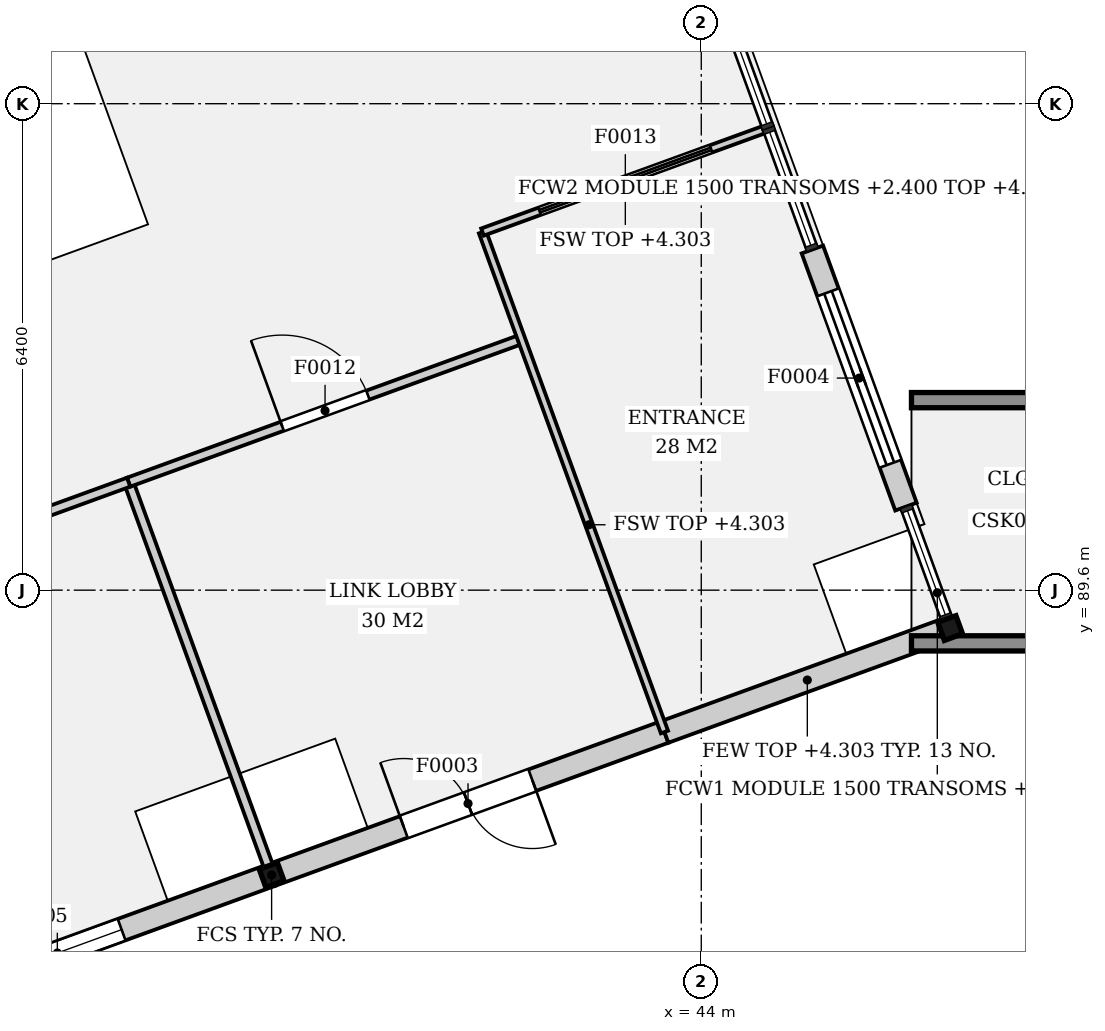
"""IFC4 building model, lengths in metres.
Left out: names, types, materials, properties, quantities, classifications, styles, units other than length and angle.
Written with IfcOpenShell. Run it as: python <this file> out.ifc"""

import sys

from ifc_helpers import new_model, si_unit, direction, frame, frame_2d, origin, origin_2d, place, context, subcontext, project, spatial, rectangle, hollow_rectangle, extrude, element, fill, save


model = new_model("IFC4")
c1 = context("Model", 3, precision=1e-05, world=origin(), true_north=direction((0.0, 1.0)))
c2 = subcontext(c1, "Body", "Model", "MODEL_VIEW")
j1 = project(units=[si_unit("LENGTHUNIT", "METRE"), si_unit("PLANEANGLEUNIT", "RADIAN")], contexts=[c1])
p1 = place(None, origin())
s1 = spatial("IfcSite", under=j1, at=p1, CompositionType="ELEMENT")
p2 = place(p1, origin())
s2 = spatial("IfcBuilding", under=s1, at=p2, CompositionType="ELEMENT")
p3 = place(p2, origin())
s3 = spatial("IfcBuildingStorey", under=s2, at=p3, CompositionType="ELEMENT", Elevation=0.0)
for number, where, z_axis, x_axis in (
    (1, (38.347, 85.852, 0.0), (0.0, 0.0, 1.0), (0.94, 0.342, 0.0)),
    (2, (47.274, 89.102, 0.0), (0.0, 0.0, 1.0), (0.94, 0.342, 0.0)),
):
    element("IfcColumn", number, at=place(p3, frame(where, z_axis=z_axis, x_axis=x_axis)), inside=s3, PredefinedType="COLUMN", context=c2, shape_type="SweptSolid", body=[
        extrude(hollow_rectangle(XDim=0.254, YDim=0.254, WallThickness=0.012, at=origin_2d()), origin(), (0.0, 0.0, 1.0), 5.0),
    ])
p4 = place(p3, frame((32.709, 83.8, 0.0), z_axis=(0.0, 0.0, 1.0), x_axis=(0.939691215801, 0.342024003465, 0.0)))
e3 = element("IfcWall", 3, at=p4, inside=s3, PredefinedType="ELEMENTEDWALL", context=c2, shape_type="SweptSolid", body=[
    extrude(rectangle(XDim=6.0, YDim=0.3, at=frame_2d((3.0, 0.0))), origin(), (0.0, 0.0, 1.0), 4.303),
])
p5 = place(p4, frame((2.1, 0.0, 0.9)))
e4 = element("IfcOpeningElement", 4, at=p5, cuts=e3, PredefinedType="OPENING", context=c2, shape_type="SweptSolid", body=[
    extrude(rectangle(XDim=1.8, YDim=2.4, at=frame_2d((0.9, 1.2))), frame((0.0, 0.16, 0.0), z_axis=(0.0, -1.0, 0.0), x_axis=(1.0, 0.0, 0.0)), (0.0, 0.0, 1.0), 0.32),
])
p6 = place(p3, frame((38.347, 85.852, 0.0), z_axis=(0.0, 0.0, 1.0), x_axis=(0.939690992795, 0.34202461616, 0.0)))
e5 = element("IfcWall", 5, at=p6, inside=s3, PredefinedType="ELEMENTEDWALL", context=c2, shape_type="SweptSolid", body=[
    extrude(rectangle(XDim=5.5, YDim=0.3, at=frame_2d((2.75, 0.0))), origin(), (0.0, 0.0, 1.0), 4.303),
])
p7 = place(p6, frame((1.85, 0.0, 0.0)))
e6 = element("IfcOpeningElement", 6, at=p7, cuts=e5, PredefinedType="OPENING", context=c2, shape_type="SweptSolid", body=[
    extrude(rectangle(XDim=1.8, YDim=2.1, at=frame_2d((0.9, 1.05))), frame((0.0, 0.16, 0.0), z_axis=(0.0, -1.0, 0.0), x_axis=(1.0, 0.0, 0.0)), (0.0, 0.0, 1.0), 0.32),
])
p8 = place(p3, frame((43.516, 87.733, 0.0), z_axis=(0.0, 0.0, 1.0), x_axis=(0.939686455819, 0.342037080957, 0.0)))
e7 = element("IfcWall", 7, at=p8, inside=s3, PredefinedType="ELEMENTEDWALL", context=c2, shape_type="SweptSolid", body=[
    extrude(rectangle(XDim=4.0, YDim=0.3, at=frame_2d((2.0, 0.0))), origin(), (0.0, 0.0, 1.0), 4.303),
])
p9 = place(p3, frame((46.693, 90.699, 0.0), z_axis=(0.0, 0.0, 1.0), x_axis=(-0.342009868999, 0.939696360271, 0.0)))
e8 = element("IfcWall", 8, at=p9, inside=s3, PredefinedType="ELEMENTEDWALL", context=c2, shape_type="SweptSolid", body=[
    extrude(rectangle(XDim=3.6, YDim=0.3, at=frame_2d((1.8, 0.0))), origin(), (0.0, 0.0, 1.0), 4.303),
])
p10 = place(p9, frame((0.6, 0.0, 0.0)))
e9 = element("IfcOpeningElement", 9, at=p10, cuts=e8, PredefinedType="OPENING", context=c2, shape_type="SweptSolid", body=[
    extrude(rectangle(XDim=2.4, YDim=2.4, at=frame_2d((1.2, 1.2))), frame((0.0, 0.16, 0.0), z_axis=(0.0, -1.0, 0.0), x_axis=(1.0, 0.0, 0.0)), (0.0, 0.0, 1.0), 0.32),
])
p11 = place(p3, frame((46.765, 92.1, 0.0), z_axis=(0.0, 0.0, 1.0), x_axis=(1.0, 0.0, 0.0)))
e10 = element("IfcWall", 10, at=p11, inside=s3, PredefinedType="ELEMENTEDWALL", context=c2, shape_type="SweptSolid", body=[
    extrude(rectangle(XDim=5.235, YDim=0.2, at=frame_2d((2.617, 0.0))), origin(), (0.0, 0.0, 1.0), 3.2),
])
p12 = place(p11, frame((1.717, 0.0, 0.0)))
e11 = element("IfcOpeningElement", 11, at=p12, cuts=e10, PredefinedType="OPENING", context=c2, shape_type="SweptSolid", body=[
    extrude(rectangle(XDim=1.8, YDim=2.4, at=frame_2d((0.9, 1.2))), frame((0.0, 0.11, 0.0), z_axis=(0.0, -1.0, 0.0), x_axis=(1.0, 0.0, 0.0)), (0.0, 0.0, 1.0), 0.22),
])
p13 = place(p3, frame((46.765, 88.9, 0.0), z_axis=(0.0, 0.0, 1.0), x_axis=(1.0, 0.0, 0.0)))
e12 = element("IfcWall", 12, at=p13, inside=s3, PredefinedType="ELEMENTEDWALL", context=c2, shape_type="SweptSolid", body=[
    extrude(rectangle(XDim=5.235, YDim=0.2, at=frame_2d((2.617, 0.0))), origin(), (0.0, 0.0, 1.0), 3.2),
])
p14 = place(p13, frame((1.817, 0.0, 0.9)))
e13 = element("IfcOpeningElement", 13, at=p14, cuts=e12, PredefinedType="OPENING", context=c2, shape_type="SweptSolid", body=[
    extrude(rectangle(XDim=1.6, YDim=1.6, at=frame_2d((0.8, 0.8))), frame((0.0, 0.11, 0.0), z_axis=(0.0, -1.0, 0.0), x_axis=(1.0, 0.0, 0.0)), (0.0, 0.0, 1.0), 0.22),
])
p15 = place(p3, frame((38.347, 85.852, 0.0), z_axis=(0.0, 0.0, 1.0), x_axis=(-0.34202461616, 0.939690992795, 0.0)))
e14 = element("IfcWall", 14, at=p15, inside=s3, PredefinedType="PARTITIONING", context=c2, shape_type="SweptSolid", body=[
    extrude(rectangle(XDim=5.5, YDim=0.125, at=frame_2d((2.75, 0.0))), origin(), (0.0, 0.0, 1.0), 4.187),
])
p16 = place(p3, frame((36.466, 91.021, 0.0), z_axis=(0.0, 0.0, 1.0), x_axis=(0.939690992795, 0.34202461616, 0.0)))
e15 = element("IfcWall", 15, at=p16, inside=s3, PredefinedType="PARTITIONING", context=c2, shape_type="SweptSolid", body=[
    extrude(rectangle(XDim=5.5, YDim=0.125, at=frame_2d((2.75, 0.0))), origin(), (0.0, 0.0, 1.0), 4.187),
])
p17 = place(p16, frame((2.15, 0.0, 0.0)))
e16 = element("IfcOpeningElement", 16, at=p17, cuts=e15, PredefinedType="OPENING", context=c2, shape_type="SweptSolid", body=[
    extrude(rectangle(XDim=1.2, YDim=2.1, at=frame_2d((0.6, 1.05))), frame((0.0, 0.073, 0.0), z_axis=(0.0, -1.0, 0.0), x_axis=(1.0, 0.0, 0.0)), (0.0, 0.0, 1.0), 0.145),
])
p18 = place(p3, frame((30.828, 88.969, 0.0), z_axis=(0.0, 0.0, 1.0), x_axis=(0.939704292321, 0.341988074343, 0.0)))
e17 = element("IfcWall", 17, at=p18, inside=s3, PredefinedType="PARTITIONING", context=c2, shape_type="SweptSolid", body=[
    extrude(rectangle(XDim=6.0, YDim=0.125, at=frame_2d((3.0, 0.0))), origin(), (0.0, 0.0, 1.0), 4.187),
])
p19 = place(p18, frame((2.4, 0.0, 0.0)))
e18 = element("IfcOpeningElement", 18, at=p19, cuts=e17, PredefinedType="OPENING", context=c2, shape_type="SweptSolid", body=[
    extrude(rectangle(XDim=1.2, YDim=2.1, at=frame_2d((0.6, 1.05))), frame((0.0, 0.073, 0.0), z_axis=(0.0, -1.0, 0.0), x_axis=(1.0, 0.0, 0.0)), (0.0, 0.0, 1.0), 0.145),
])
p20 = place(p3, frame((43.516, 87.733, 0.0), z_axis=(0.0, 0.0, 1.0), x_axis=(-0.342037080957, 0.939686455819, 0.0)))
e19 = element("IfcWall", 19, at=p20, inside=s3, PredefinedType="PARTITIONING", context=c2, shape_type="SweptSolid", body=[
    extrude(rectangle(XDim=7.0, YDim=0.1, at=frame_2d((3.5, 0.0))), origin(), (0.0, 0.0, 1.0), 4.303),
])
p21 = place(p3, frame((41.121, 94.311, 0.0), z_axis=(0.0, 0.0, 1.0), x_axis=(0.939706071622, 0.341983185197, 0.0)))
e20 = element("IfcWall", 20, at=p21, inside=s3, PredefinedType="PARTITIONING", context=c2, shape_type="SweptSolid", body=[
    extrude(rectangle(XDim=4.0, YDim=0.1, at=frame_2d((2.0, 0.0))), origin(), (0.0, 0.0, 1.0), 4.303),
])
p22 = place(p21, frame((0.8, 0.0, 0.0)))
e21 = element("IfcOpeningElement", 21, at=p22, cuts=e20, PredefinedType="OPENING", context=c2, shape_type="SweptSolid", body=[
    extrude(rectangle(XDim=2.4, YDim=2.4, at=frame_2d((1.2, 1.2))), frame((0.0, 0.06, 0.0), z_axis=(0.0, -1.0, 0.0), x_axis=(1.0, 0.0, 0.0)), (0.0, 0.0, 1.0), 0.12),
])
p23 = place(p7, origin())
e22 = element("IfcDoor", 22, at=p23, inside=s3, OperationType="DOUBLE_DOOR_SINGLE_SWING", PredefinedType="DOOR", context=c2, shape_type="SweptSolid", body=[
    extrude(rectangle(XDim=1.8, YDim=2.1, at=frame_2d((0.9, 1.05))), frame((0.0, 0.025, 0.0), z_axis=(0.0, -1.0, 0.0), x_axis=(1.0, 0.0, 0.0)), (0.0, 0.0, 1.0), 0.05),
])
fill(e6, e22)
p24 = place(p10, origin())
e23 = element("IfcDoor", 23, at=p24, inside=s3, OperationType="DOUBLE_DOOR_SLIDING", PredefinedType="DOOR", context=c2, shape_type="SweptSolid", body=[
    extrude(rectangle(XDim=2.4, YDim=2.4, at=frame_2d((1.2, 1.2))), frame((0.0, 0.025, 0.0), z_axis=(0.0, -1.0, 0.0), x_axis=(1.0, 0.0, 0.0)), (0.0, 0.0, 1.0), 0.05),
])
fill(e9, e23)
p25 = place(p5, origin())
e24 = element("IfcWindow", 24, at=p25, inside=s3, PartitioningType="SINGLE_PANEL", PredefinedType="WINDOW", context=c2, shape_type="SweptSolid", body=[
    extrude(rectangle(XDim=1.8, YDim=2.4, at=frame_2d((0.9, 1.2))), frame((0.0, 0.03, 0.0), z_axis=(0.0, -1.0, 0.0), x_axis=(1.0, 0.0, 0.0)), (0.0, 0.0, 1.0), 0.06),
])
fill(e4, e24)
p26 = place(p17, origin())
e25 = element("IfcDoor", 25, at=p26, inside=s3, OperationType="SINGLE_SWING_LEFT", PredefinedType="DOOR", context=c2, shape_type="SweptSolid", body=[
    extrude(rectangle(XDim=1.2, YDim=2.1, at=frame_2d((0.6, 1.05))), frame((0.0, 0.025, 0.0), z_axis=(0.0, -1.0, 0.0), x_axis=(1.0, 0.0, 0.0)), (0.0, 0.0, 1.0), 0.05),
])
fill(e16, e25)
p27 = place(p22, origin())
e26 = element("IfcDoor", 26, at=p27, inside=s3, OperationType="DOUBLE_DOOR_SLIDING", PredefinedType="DOOR", context=c2, shape_type="SweptSolid", body=[
    extrude(rectangle(XDim=2.4, YDim=2.4, at=frame_2d((1.2, 1.2))), frame((0.0, 0.025, 0.0), z_axis=(0.0, -1.0, 0.0), x_axis=(1.0, 0.0, 0.0)), (0.0, 0.0, 1.0), 0.05),
])
fill(e21, e26)
save(model, sys.argv[1])
